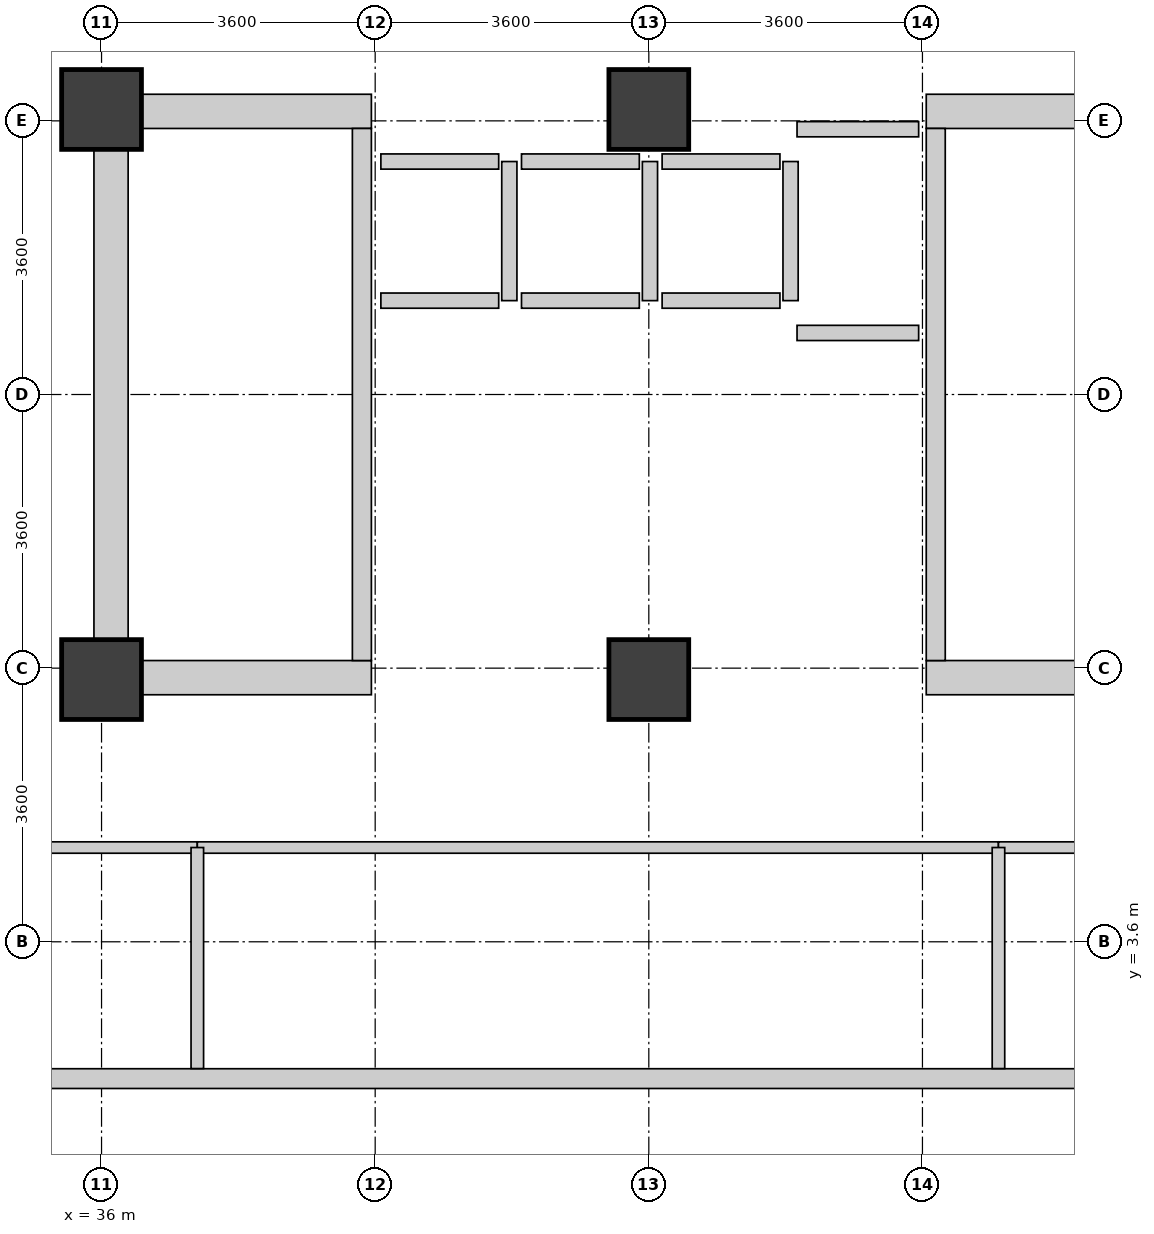
"""IFC4 building model, lengths in metres.
Left out: names, types, materials, properties, quantities, classifications, styles, units other than length and angle.
Written with IfcOpenShell. Run it as: python <this file> out.ifc"""

import sys

from ifc_helpers import new_model, si_unit, direction, frame, frame_2d, origin, origin_2d, place, context, subcontext, project, spatial, rectangle, extrude, source, transform, mapped, element, fill, save


model = new_model("IFC4")
c1 = context("Model", 3, precision=1e-05, world=origin(), true_north=direction((0.0, 1.0)))
c2 = subcontext(c1, "Body", "Model", "MODEL_VIEW")
j1 = project(units=[si_unit("LENGTHUNIT", "METRE"), si_unit("PLANEANGLEUNIT", "RADIAN")], contexts=[c1])
p1 = place(None, origin())
s1 = spatial("IfcSite", under=j1, at=p1, CompositionType="ELEMENT")
p2 = place(p1, origin())
s2 = spatial("IfcBuilding", under=s1, at=p2, CompositionType="ELEMENT")
p3 = place(p2, frame((0.0, 0.0, 135.6)))
s3 = spatial("IfcBuildingStorey", under=s2, at=p3, CompositionType="ELEMENT", Elevation=135.6)
p4 = place(p3, frame((36.125, 6.85, 0.0), z_axis=(0.0, 0.0, 1.0), x_axis=(0.0, 1.0, 0.0)))
e1 = element("IfcWall", 1, at=p4, inside=s3, PredefinedType="SHEAR", context=c2, shape_type="SweptSolid", body=[
    extrude(rectangle(XDim=7.9, YDim=0.45, at=frame_2d((3.95, 0.0))), origin(), (0.0, 0.0, 1.0), 4.36),
])
for number, where, z_axis, x_axis in (
    (2, (36.35, 7.075, 0.0), (0.0, 0.0, 1.0), (1.0, 0.0, 0.0)),
    (3, (46.85, 7.075, 0.0), (0.0, 0.0, 1.0), (1.0, 0.0, 0.0)),
    (4, (36.35, 14.525, 0.0), (0.0, 0.0, 1.0), (1.0, 0.0, 0.0)),
    (5, (46.85, 14.525, 0.0), (0.0, 0.0, 1.0), (1.0, 0.0, 0.0)),
):
    element("IfcWall", number, at=place(p3, frame(where, z_axis=z_axis, x_axis=x_axis)), inside=s3, PredefinedType="SHEAR", context=c2, shape_type="SweptSolid", body=[
        extrude(rectangle(XDim=3.2, YDim=0.45, at=frame_2d((1.6, 0.0))), origin(), (0.0, 0.0, 1.0), 4.36),
    ])
p5 = place(p3, frame((39.425, 7.3, 0.0), z_axis=(0.0, 0.0, 1.0), x_axis=(0.0, 1.0, 0.0)))
e6 = element("IfcWall", 6, at=p5, inside=s3, PredefinedType="SHEAR", context=c2, shape_type="SweptSolid", body=[
    extrude(rectangle(XDim=7.0, YDim=0.25, at=frame_2d((3.5, 0.0))), origin(), (0.0, 0.0, 1.0), 4.36),
])
p6 = place(p5, frame((0.15, 0.0, 0.0)))
e7 = element("IfcOpeningElement", 7, at=p6, cuts=e6, PredefinedType="OPENING", context=c2, shape_type="SweptSolid", body=[
    extrude(rectangle(XDim=1.1, YDim=2.08, at=frame_2d((0.55, 1.04))), frame((0.0, 0.135, 0.0), z_axis=(0.0, -1.0, 0.0), x_axis=(1.0, 0.0, 0.0)), (0.0, 0.0, 1.0), 0.27),
])
p7 = place(p3, frame((46.975, 7.3, 0.0), z_axis=(0.0, 0.0, 1.0), x_axis=(0.0, 1.0, 0.0)))
e8 = element("IfcWall", 8, at=p7, inside=s3, PredefinedType="SHEAR", context=c2, shape_type="SweptSolid", body=[
    extrude(rectangle(XDim=7.0, YDim=0.25, at=frame_2d((3.5, 0.0))), origin(), (0.0, 0.0, 1.0), 4.36),
])
p8 = place(p7, frame((0.15, 0.0, 0.0)))
e9 = element("IfcOpeningElement", 9, at=p8, cuts=e8, PredefinedType="OPENING", context=c2, shape_type="SweptSolid", body=[
    extrude(rectangle(XDim=1.1, YDim=2.08, at=frame_2d((0.55, 1.04))), frame((0.0, 0.135, 0.0), z_axis=(0.0, -1.0, 0.0), x_axis=(1.0, 0.0, 0.0)), (0.0, 0.0, 1.0), 0.27),
])
m1 = source(origin(), c2, "Body", "SweptSolid", [
    extrude(rectangle(XDim=1.05, YDim=1.05, at=origin_2d()), origin(), (0.0, 0.0, 1.0), 4.6),
])
for number, where, z_axis, x_axis in (
    (10, (36.0, 7.05, 0.0), (0.0, 0.0, 1.0), (1.0, 0.0, 0.0)),
    (11, (36.0, 14.55, 0.0), (0.0, 0.0, 1.0), (1.0, 0.0, 0.0)),
    (12, (43.2, 7.05, 0.0), (0.0, 0.0, 1.0), (1.0, 0.0, 0.0)),
    (13, (43.2, 14.55, 0.0), (0.0, 0.0, 1.0), (1.0, 0.0, 0.0)),
):
    element("IfcColumn", number, at=place(p3, frame(where, z_axis=z_axis, x_axis=x_axis)), inside=s3, PredefinedType="COLUMN", context=c2, shape_type="MappedRepresentation", body=[
        mapped(m1, transform((0.0, 0.0, 0.0), x_axis=(1.0, 0.0, 0.0), y_axis=(0.0, 1.0, 0.0), z_axis=(0.0, 0.0, 1.0), scale=1.0)),
    ])
p9 = place(p3, frame((54.365, 1.8, 0.0), z_axis=(0.0, 0.0, 1.0), x_axis=(-1.0, 0.0, 0.0)))
e14 = element("IfcWall", 14, at=p9, inside=s3, PredefinedType="STANDARD", context=c2, shape_type="SweptSolid", body=[
    extrude(rectangle(XDim=28.53, YDim=0.26, at=frame_2d((14.265, 0.0))), origin(), (0.0, 0.0, 1.0), 4.34),
])
p10 = place(p9, frame((0.433, 0.0, 0.85)))
e15 = element("IfcOpeningElement", 15, at=p10, cuts=e14, PredefinedType="OPENING", context=c2, shape_type="SweptSolid", body=[
    extrude(rectangle(XDim=2.7, YDim=2.05, at=frame_2d((1.35, 1.025))), frame((0.0, 0.14, 0.0), z_axis=(0.0, -1.0, 0.0), x_axis=(1.0, 0.0, 0.0)), (0.0, 0.0, 1.0), 0.28),
])
p11 = place(p9, frame((7.566, 0.0, 0.85)))
e16 = element("IfcOpeningElement", 16, at=p11, cuts=e14, PredefinedType="OPENING", context=c2, shape_type="SweptSolid", body=[
    extrude(rectangle(XDim=2.7, YDim=2.05, at=frame_2d((1.35, 1.025))), frame((0.0, 0.14, 0.0), z_axis=(0.0, -1.0, 0.0), x_axis=(1.0, 0.0, 0.0)), (0.0, 0.0, 1.0), 0.28),
])
p12 = place(p9, frame((11.132, 0.0, 0.85)))
e17 = element("IfcOpeningElement", 17, at=p12, cuts=e14, PredefinedType="OPENING", context=c2, shape_type="SweptSolid", body=[
    extrude(rectangle(XDim=2.7, YDim=2.05, at=frame_2d((1.35, 1.025))), frame((0.0, 0.14, 0.0), z_axis=(0.0, -1.0, 0.0), x_axis=(1.0, 0.0, 0.0)), (0.0, 0.0, 1.0), 0.28),
])
p13 = place(p9, frame((18.264, 0.0, 0.85)))
e18 = element("IfcOpeningElement", 18, at=p13, cuts=e14, PredefinedType="OPENING", context=c2, shape_type="SweptSolid", body=[
    extrude(rectangle(XDim=2.7, YDim=2.05, at=frame_2d((1.35, 1.025))), frame((0.0, 0.14, 0.0), z_axis=(0.0, -1.0, 0.0), x_axis=(1.0, 0.0, 0.0)), (0.0, 0.0, 1.0), 0.28),
])
p14 = place(p9, frame((21.831, 0.0, 0.85)))
e19 = element("IfcOpeningElement", 19, at=p14, cuts=e14, PredefinedType="OPENING", context=c2, shape_type="SweptSolid", body=[
    extrude(rectangle(XDim=2.7, YDim=2.05, at=frame_2d((1.35, 1.025))), frame((0.0, 0.14, 0.0), z_axis=(0.0, -1.0, 0.0), x_axis=(1.0, 0.0, 0.0)), (0.0, 0.0, 1.0), 0.28),
])
p15 = place(p9, frame((25.397, 0.0, 0.85)))
e20 = element("IfcOpeningElement", 20, at=p15, cuts=e14, PredefinedType="OPENING", context=c2, shape_type="SweptSolid", body=[
    extrude(rectangle(XDim=2.7, YDim=2.05, at=frame_2d((1.35, 1.025))), frame((0.0, 0.14, 0.0), z_axis=(0.0, -1.0, 0.0), x_axis=(1.0, 0.0, 0.0)), (0.0, 0.0, 1.0), 0.28),
])
p16 = place(p3, frame((39.675, 12.035, 0.0), z_axis=(0.0, 0.0, 1.0), x_axis=(1.0, 0.0, 0.0)))
e21 = element("IfcWall", 21, at=p16, inside=s3, PredefinedType="PARTITIONING", context=c2, shape_type="SweptSolid", body=[
    extrude(rectangle(XDim=1.55, YDim=0.2, at=frame_2d((0.775, 0.0))), origin(), (0.0, 0.0, 1.0), 4.34),
])
p17 = place(p16, frame((0.225, 0.0, 0.0)))
e22 = element("IfcOpeningElement", 22, at=p17, cuts=e21, PredefinedType="OPENING", context=c2, shape_type="SweptSolid", body=[
    extrude(rectangle(XDim=1.1, YDim=2.12, at=frame_2d((0.55, 1.06))), frame((0.0, 0.11, 0.0), z_axis=(0.0, -1.0, 0.0), x_axis=(1.0, 0.0, 0.0)), (0.0, 0.0, 1.0), 0.22),
])
p18 = place(p3, frame((39.675, 13.865, 0.0), z_axis=(0.0, 0.0, 1.0), x_axis=(1.0, 0.0, 0.0)))
e23 = element("IfcWall", 23, at=p18, inside=s3, PredefinedType="PARTITIONING", context=c2, shape_type="SweptSolid", body=[
    extrude(rectangle(XDim=1.55, YDim=0.2, at=frame_2d((0.775, 0.0))), origin(), (0.0, 0.0, 1.0), 4.34),
])
p19 = place(p3, frame((41.365, 12.035, 0.0), z_axis=(0.0, 0.0, 1.0), x_axis=(0.0, 1.0, 0.0)))
e24 = element("IfcWall", 24, at=p19, inside=s3, PredefinedType="PARTITIONING", context=c2, shape_type="SweptSolid", body=[
    extrude(rectangle(XDim=1.83, YDim=0.2, at=frame_2d((0.915, 0.0))), origin(), (0.0, 0.0, 1.0), 4.34),
])
p20 = place(p3, frame((41.525, 12.035, 0.0), z_axis=(0.0, 0.0, 1.0), x_axis=(1.0, 0.0, 0.0)))
e25 = element("IfcWall", 25, at=p20, inside=s3, PredefinedType="PARTITIONING", context=c2, shape_type="SweptSolid", body=[
    extrude(rectangle(XDim=1.55, YDim=0.2, at=frame_2d((0.775, 0.0))), origin(), (0.0, 0.0, 1.0), 4.34),
])
p21 = place(p20, frame((0.225, 0.0, 0.0)))
e26 = element("IfcOpeningElement", 26, at=p21, cuts=e25, PredefinedType="OPENING", context=c2, shape_type="SweptSolid", body=[
    extrude(rectangle(XDim=1.1, YDim=2.12, at=frame_2d((0.55, 1.06))), frame((0.0, 0.11, 0.0), z_axis=(0.0, -1.0, 0.0), x_axis=(1.0, 0.0, 0.0)), (0.0, 0.0, 1.0), 0.22),
])
p22 = place(p3, frame((41.525, 13.865, 0.0), z_axis=(0.0, 0.0, 1.0), x_axis=(1.0, 0.0, 0.0)))
e27 = element("IfcWall", 27, at=p22, inside=s3, PredefinedType="PARTITIONING", context=c2, shape_type="SweptSolid", body=[
    extrude(rectangle(XDim=1.55, YDim=0.2, at=frame_2d((0.775, 0.0))), origin(), (0.0, 0.0, 1.0), 4.34),
])
p23 = place(p3, frame((43.215, 12.035, 0.0), z_axis=(0.0, 0.0, 1.0), x_axis=(0.0, 1.0, 0.0)))
e28 = element("IfcWall", 28, at=p23, inside=s3, PredefinedType="PARTITIONING", context=c2, shape_type="SweptSolid", body=[
    extrude(rectangle(XDim=1.83, YDim=0.2, at=frame_2d((0.915, 0.0))), origin(), (0.0, 0.0, 1.0), 4.34),
])
p24 = place(p3, frame((43.375, 12.035, 0.0), z_axis=(0.0, 0.0, 1.0), x_axis=(1.0, 0.0, 0.0)))
e29 = element("IfcWall", 29, at=p24, inside=s3, PredefinedType="PARTITIONING", context=c2, shape_type="SweptSolid", body=[
    extrude(rectangle(XDim=1.55, YDim=0.2, at=frame_2d((0.775, 0.0))), origin(), (0.0, 0.0, 1.0), 4.34),
])
p25 = place(p24, frame((0.225, 0.0, 0.0)))
e30 = element("IfcOpeningElement", 30, at=p25, cuts=e29, PredefinedType="OPENING", context=c2, shape_type="SweptSolid", body=[
    extrude(rectangle(XDim=1.1, YDim=2.12, at=frame_2d((0.55, 1.06))), frame((0.0, 0.11, 0.0), z_axis=(0.0, -1.0, 0.0), x_axis=(1.0, 0.0, 0.0)), (0.0, 0.0, 1.0), 0.22),
])
p26 = place(p3, frame((43.375, 13.865, 0.0), z_axis=(0.0, 0.0, 1.0), x_axis=(1.0, 0.0, 0.0)))
e31 = element("IfcWall", 31, at=p26, inside=s3, PredefinedType="PARTITIONING", context=c2, shape_type="SweptSolid", body=[
    extrude(rectangle(XDim=1.55, YDim=0.2, at=frame_2d((0.775, 0.0))), origin(), (0.0, 0.0, 1.0), 4.34),
])
p27 = place(p3, frame((45.065, 12.035, 0.0), z_axis=(0.0, 0.0, 1.0), x_axis=(0.0, 1.0, 0.0)))
e32 = element("IfcWall", 32, at=p27, inside=s3, PredefinedType="PARTITIONING", context=c2, shape_type="SweptSolid", body=[
    extrude(rectangle(XDim=1.83, YDim=0.2, at=frame_2d((0.915, 0.0))), origin(), (0.0, 0.0, 1.0), 4.34),
])
p28 = place(p3, frame((45.15, 11.61, 0.0), z_axis=(0.0, 0.0, 1.0), x_axis=(1.0, 0.0, 0.0)))
e33 = element("IfcWall", 33, at=p28, inside=s3, PredefinedType="PARTITIONING", context=c2, shape_type="SweptSolid", body=[
    extrude(rectangle(XDim=1.6, YDim=0.2, at=frame_2d((0.8, 0.0))), origin(), (0.0, 0.0, 1.0), 4.34),
])
p29 = place(p28, frame((0.25, 0.0, 0.0)))
e34 = element("IfcOpeningElement", 34, at=p29, cuts=e33, PredefinedType="OPENING", context=c2, shape_type="SweptSolid", body=[
    extrude(rectangle(XDim=1.1, YDim=2.12, at=frame_2d((0.55, 1.06))), frame((0.0, 0.11, 0.0), z_axis=(0.0, -1.0, 0.0), x_axis=(1.0, 0.0, 0.0)), (0.0, 0.0, 1.0), 0.22),
])
p30 = place(p3, frame((45.15, 14.29, 0.0), z_axis=(0.0, 0.0, 1.0), x_axis=(1.0, 0.0, 0.0)))
e35 = element("IfcWall", 35, at=p30, inside=s3, PredefinedType="PARTITIONING", context=c2, shape_type="SweptSolid", body=[
    extrude(rectangle(XDim=1.6, YDim=0.2, at=frame_2d((0.8, 0.0))), origin(), (0.0, 0.0, 1.0), 3.34),
])
p31 = place(p3, frame((25.832, 4.84, 0.0), z_axis=(0.0, 0.0, 1.0), x_axis=(1.0, 0.0, 0.0)))
e36 = element("IfcWall", 36, at=p31, inside=s3, PredefinedType="PARTITIONING", context=c2, shape_type="SweptSolid", body=[
    extrude(rectangle(XDim=11.428, YDim=0.15, at=frame_2d((5.714, 0.0))), origin(), (0.0, 0.0, 1.0), 4.34),
])
p32 = place(p31, frame((5.064, 0.0, 0.0)))
e37 = element("IfcOpeningElement", 37, at=p32, cuts=e36, PredefinedType="OPENING", context=c2, shape_type="SweptSolid", body=[
    extrude(rectangle(XDim=1.3, YDim=2.12, at=frame_2d((0.65, 1.06))), frame((0.0, 0.085, 0.0), z_axis=(0.0, -1.0, 0.0), x_axis=(1.0, 0.0, 0.0)), (0.0, 0.0, 1.0), 0.17),
])
p33 = place(p3, frame((37.26, 4.84, 0.0), z_axis=(0.0, 0.0, 1.0), x_axis=(1.0, 0.0, 0.0)))
e38 = element("IfcWall", 38, at=p33, inside=s3, PredefinedType="PARTITIONING", context=c2, shape_type="SweptSolid", body=[
    extrude(rectangle(XDim=10.54, YDim=0.15, at=frame_2d((5.27, 0.0))), origin(), (0.0, 0.0, 1.0), 4.34),
])
p34 = place(p33, frame((4.82, 0.0, 0.0)))
e39 = element("IfcOpeningElement", 39, at=p34, cuts=e38, PredefinedType="OPENING", context=c2, shape_type="SweptSolid", body=[
    extrude(rectangle(XDim=0.9, YDim=2.08, at=frame_2d((0.45, 1.04))), frame((0.0, 0.085, 0.0), z_axis=(0.0, -1.0, 0.0), x_axis=(1.0, 0.0, 0.0)), (0.0, 0.0, 1.0), 0.17),
])
p35 = place(p3, frame((47.8, 4.84, 0.0), z_axis=(0.0, 0.0, 1.0), x_axis=(1.0, 0.0, 0.0)))
e40 = element("IfcWall", 40, at=p35, inside=s3, PredefinedType="PARTITIONING", context=c2, shape_type="SweptSolid", body=[
    extrude(rectangle(XDim=6.568, YDim=0.15, at=frame_2d((3.284, 0.0))), origin(), (0.0, 0.0, 1.0), 4.34),
])
p36 = place(p35, frame((2.634, 0.0, 0.0)))
e41 = element("IfcOpeningElement", 41, at=p36, cuts=e40, PredefinedType="OPENING", context=c2, shape_type="SweptSolid", body=[
    extrude(rectangle(XDim=1.3, YDim=2.12, at=frame_2d((0.65, 1.06))), frame((0.0, 0.085, 0.0), z_axis=(0.0, -1.0, 0.0), x_axis=(1.0, 0.0, 0.0)), (0.0, 0.0, 1.0), 0.17),
])
for number, where, z_axis, x_axis in (
    (42, (37.26, 1.932, 0.0), (0.0, 0.0, 1.0), (0.0, 1.0, 0.0)),
    (43, (47.8, 1.932, 0.0), (0.0, 0.0, 1.0), (0.0, 1.0, 0.0)),
):
    element("IfcWall", number, at=place(p3, frame(where, z_axis=z_axis, x_axis=x_axis)), inside=s3, PredefinedType="PARTITIONING", context=c2, shape_type="SweptSolid", body=[
        extrude(rectangle(XDim=2.908, YDim=0.165, at=frame_2d((1.454, 0.0))), origin(), (0.0, 0.0, 1.0), 4.34),
    ])
p37 = place(p11, origin())
e44 = element("IfcWindow", 44, at=p37, inside=s3, PartitioningType="SINGLE_PANEL", PredefinedType="WINDOW", context=c2, shape_type="SweptSolid", body=[
    extrude(rectangle(XDim=2.7, YDim=2.05, at=frame_2d((1.35, 1.025))), frame((0.0, 0.03, 0.0), z_axis=(0.0, -1.0, 0.0), x_axis=(1.0, 0.0, 0.0)), (0.0, 0.0, 1.0), 0.06),
])
fill(e16, e44)
p38 = place(p12, origin())
e45 = element("IfcWindow", 45, at=p38, inside=s3, PartitioningType="SINGLE_PANEL", PredefinedType="WINDOW", context=c2, shape_type="SweptSolid", body=[
    extrude(rectangle(XDim=2.7, YDim=2.05, at=frame_2d((1.35, 1.025))), frame((0.0, 0.03, 0.0), z_axis=(0.0, -1.0, 0.0), x_axis=(1.0, 0.0, 0.0)), (0.0, 0.0, 1.0), 0.06),
])
fill(e17, e45)
p39 = place(p13, origin())
e46 = element("IfcWindow", 46, at=p39, inside=s3, PartitioningType="SINGLE_PANEL", PredefinedType="WINDOW", context=c2, shape_type="SweptSolid", body=[
    extrude(rectangle(XDim=2.7, YDim=2.05, at=frame_2d((1.35, 1.025))), frame((0.0, 0.03, 0.0), z_axis=(0.0, -1.0, 0.0), x_axis=(1.0, 0.0, 0.0)), (0.0, 0.0, 1.0), 0.06),
])
fill(e18, e46)
p40 = place(p6, origin())
e47 = element("IfcDoor", 47, at=p40, inside=s3, OperationType="SINGLE_SWING_RIGHT", PredefinedType="DOOR", context=c2, shape_type="SweptSolid", body=[
    extrude(rectangle(XDim=1.1, YDim=2.08, at=frame_2d((0.55, 1.04))), frame((0.0, 0.025, 0.0), z_axis=(0.0, -1.0, 0.0), x_axis=(1.0, 0.0, 0.0)), (0.0, 0.0, 1.0), 0.05),
])
fill(e7, e47)
p41 = place(p8, origin())
e48 = element("IfcDoor", 48, at=p41, inside=s3, OperationType="SINGLE_SWING_LEFT", PredefinedType="DOOR", context=c2, shape_type="SweptSolid", body=[
    extrude(rectangle(XDim=1.1, YDim=2.08, at=frame_2d((0.55, 1.04))), frame((0.0, 0.025, 0.0), z_axis=(0.0, -1.0, 0.0), x_axis=(1.0, 0.0, 0.0)), (0.0, 0.0, 1.0), 0.05),
])
fill(e9, e48)
p42 = place(p17, origin())
e49 = element("IfcDoor", 49, at=p42, inside=s3, OperationType="SLIDING_TO_LEFT", PredefinedType="DOOR", context=c2, shape_type="SweptSolid", body=[
    extrude(rectangle(XDim=1.1, YDim=2.12, at=frame_2d((0.55, 1.06))), frame((0.0, 0.025, 0.0), z_axis=(0.0, -1.0, 0.0), x_axis=(1.0, 0.0, 0.0)), (0.0, 0.0, 1.0), 0.05),
])
fill(e22, e49)
p43 = place(p21, origin())
e50 = element("IfcDoor", 50, at=p43, inside=s3, OperationType="SLIDING_TO_LEFT", PredefinedType="DOOR", context=c2, shape_type="SweptSolid", body=[
    extrude(rectangle(XDim=1.1, YDim=2.12, at=frame_2d((0.55, 1.06))), frame((0.0, 0.025, 0.0), z_axis=(0.0, -1.0, 0.0), x_axis=(1.0, 0.0, 0.0)), (0.0, 0.0, 1.0), 0.05),
])
fill(e26, e50)
p44 = place(p25, origin())
e51 = element("IfcDoor", 51, at=p44, inside=s3, OperationType="SLIDING_TO_LEFT", PredefinedType="DOOR", context=c2, shape_type="SweptSolid", body=[
    extrude(rectangle(XDim=1.1, YDim=2.12, at=frame_2d((0.55, 1.06))), frame((0.0, 0.025, 0.0), z_axis=(0.0, -1.0, 0.0), x_axis=(1.0, 0.0, 0.0)), (0.0, 0.0, 1.0), 0.05),
])
fill(e30, e51)
p45 = place(p29, origin())
e52 = element("IfcDoor", 52, at=p45, inside=s3, OperationType="SLIDING_TO_LEFT", PredefinedType="DOOR", context=c2, shape_type="SweptSolid", body=[
    extrude(rectangle(XDim=1.1, YDim=2.12, at=frame_2d((0.55, 1.06))), frame((0.0, 0.025, 0.0), z_axis=(0.0, -1.0, 0.0), x_axis=(1.0, 0.0, 0.0)), (0.0, 0.0, 1.0), 0.05),
])
fill(e34, e52)
p46 = place(p34, origin())
e53 = element("IfcDoor", 53, at=p46, inside=s3, OperationType="SINGLE_SWING_LEFT", PredefinedType="DOOR", context=c2, shape_type="SweptSolid", body=[
    extrude(rectangle(XDim=0.9, YDim=2.08, at=frame_2d((0.45, 1.04))), frame((0.0, 0.025, 0.0), z_axis=(0.0, -1.0, 0.0), x_axis=(1.0, 0.0, 0.0)), (0.0, 0.0, 1.0), 0.05),
])
fill(e39, e53)
save(model, sys.argv[1])
